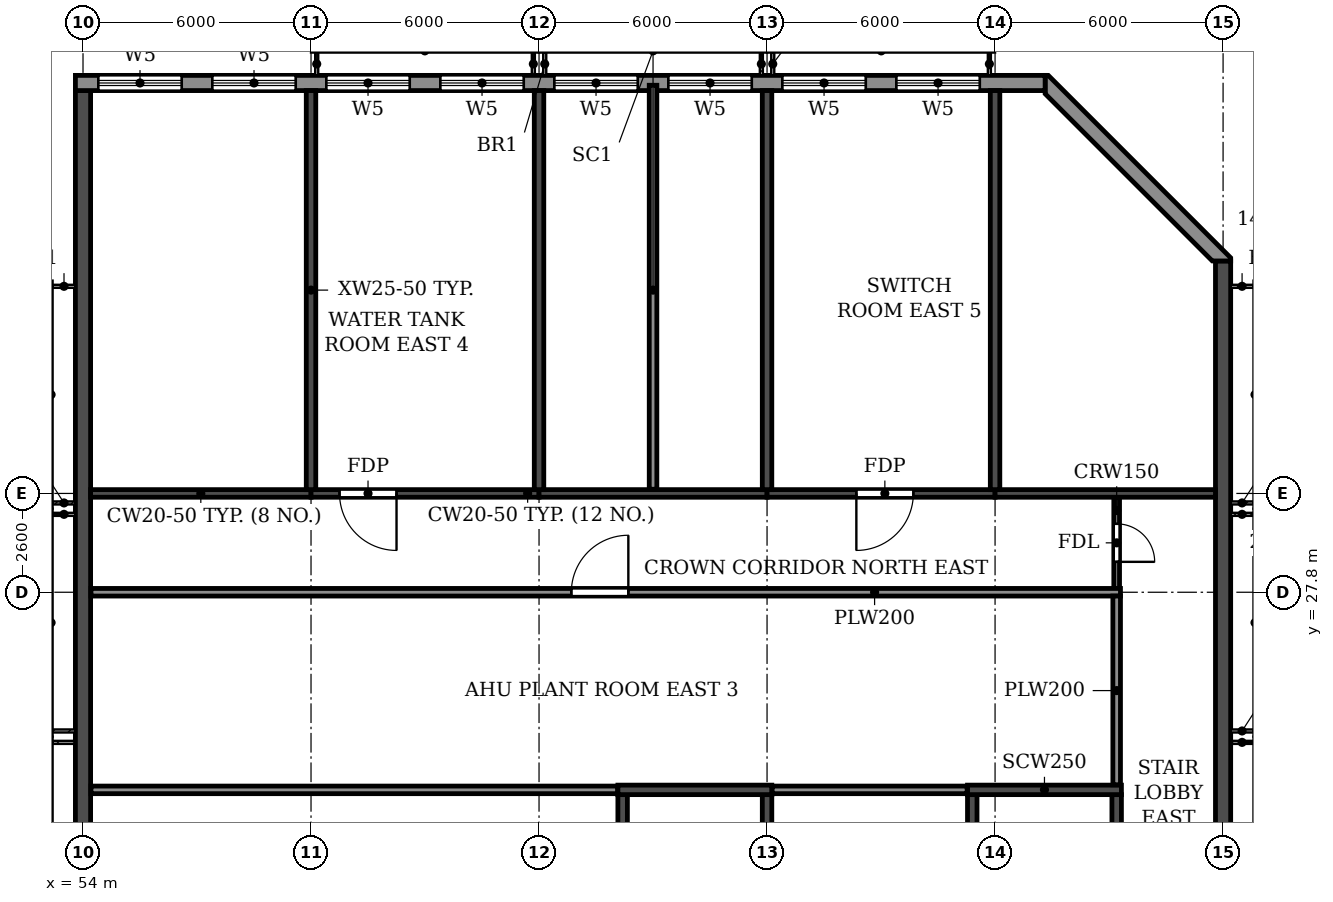
"""IFC4 building model, lengths in metres.
Left out: names, types, materials, properties, quantities, classifications, styles, units other than length and angle.
Written with IfcOpenShell. Run it as: python <this file> out.ifc"""

import sys

from ifc_helpers import new_model, si_unit, direction, frame, frame_2d, origin, place, context, subcontext, project, spatial, polyline, rectangle, outline, extrude, element, fill, save


model = new_model("IFC4")
c1 = context("Model", 3, precision=1e-05, world=origin(), true_north=direction((0.0, 1.0)))
c2 = subcontext(c1, "Body", "Model", "MODEL_VIEW")
j1 = project(units=[si_unit("LENGTHUNIT", "METRE"), si_unit("PLANEANGLEUNIT", "RADIAN")], contexts=[c1])
p1 = place(None, origin())
s1 = spatial("IfcSite", under=j1, at=p1, CompositionType="ELEMENT")
p2 = place(p1, origin())
s2 = spatial("IfcBuilding", under=s1, at=p2, CompositionType="ELEMENT")
p3 = place(p2, frame((0.0, 0.0, 282.3)))
s3 = spatial("IfcBuildingStorey", under=s2, at=p3, CompositionType="ELEMENT", Elevation=282.3)
for number, where, z_axis, x_axis in (
    (1, (60.0, 30.5, 0.0), (0.0, 0.0, 1.0), (0.0, 1.0, 0.0)),
    (2, (66.0, 30.5, 0.0), (0.0, 0.0, 1.0), (0.0, 1.0, 0.0)),
    (3, (72.0, 30.5, 0.0), (0.0, 0.0, 1.0), (0.0, 1.0, 0.0)),
    (4, (78.0, 30.5, 0.0), (0.0, 0.0, 1.0), (0.0, 1.0, 0.0)),
):
    element("IfcWall", number, at=place(p3, frame(where, z_axis=z_axis, x_axis=x_axis)), inside=s3, PredefinedType="SHEAR", context=c2, shape_type="SweptSolid", body=[
        extrude(rectangle(XDim=10.5, YDim=0.25, at=frame_2d((5.25, 0.0))), origin(), (0.0, 0.0, 1.0), 3.05),
    ])
p4 = place(p3, frame((54.0, 0.2, 0.0), z_axis=(0.0, 0.0, 1.0), x_axis=(0.0, 1.0, 0.0)))
e5 = element("IfcWall", 5, at=p4, inside=s3, PredefinedType="SHEAR", context=c2, shape_type="SweptSolid", body=[
    extrude(rectangle(XDim=40.8, YDim=0.4, at=frame_2d((20.4, 0.0))), origin(), (0.0, 0.0, 1.0), 3.05),
])
p5 = place(p3, frame((84.0, 4.683, 0.0), z_axis=(0.0, 0.0, 1.0), x_axis=(0.0, 1.0, 0.0)))
e6 = element("IfcWall", 6, at=p5, inside=s3, PredefinedType="SHEAR", context=c2, shape_type="SweptSolid", body=[
    extrude(rectangle(XDim=31.834, YDim=0.4, at=frame_2d((15.917, 0.0))), origin(), (0.0, 0.0, 1.0), 3.05),
])
p6 = place(p3, frame((54.2, 30.4, 0.0), z_axis=(0.0, 0.0, 1.0), x_axis=(1.0, 0.0, 0.0)))
e7 = element("IfcWall", 7, at=p6, inside=s3, PredefinedType="SHEAR", context=c2, shape_type="SweptSolid", body=[
    extrude(rectangle(XDim=5.8, YDim=0.2, at=frame_2d((2.9, 0.0))), origin(), (0.0, 0.0, 1.0), 2.45),
])
p7 = place(p3, frame((60.0, 30.4, 0.0), z_axis=(0.0, 0.0, 1.0), x_axis=(1.0, 0.0, 0.0)))
e8 = element("IfcWall", 8, at=p7, inside=s3, PredefinedType="SHEAR", context=c2, shape_type="SweptSolid", body=[
    extrude(rectangle(XDim=6.0, YDim=0.2, at=frame_2d((3.0, 0.0))), origin(), (0.0, 0.0, 1.0), 2.45),
])
p8 = place(p7, frame((0.75, 0.0, 0.0)))
e9 = element("IfcOpeningElement", 9, at=p8, cuts=e8, PredefinedType="OPENING", context=c2, shape_type="SweptSolid", body=[
    extrude(rectangle(XDim=1.5, YDim=2.1, at=frame_2d((0.75, 1.05))), frame((0.0, 0.11, 0.0), z_axis=(0.0, -1.0, 0.0), x_axis=(1.0, 0.0, 0.0)), (0.0, 0.0, 1.0), 0.22),
])
p9 = place(p3, frame((66.0, 30.4, 0.0), z_axis=(0.0, 0.0, 1.0), x_axis=(1.0, 0.0, 0.0)))
e10 = element("IfcWall", 10, at=p9, inside=s3, PredefinedType="SHEAR", context=c2, shape_type="SweptSolid", body=[
    extrude(rectangle(XDim=6.0, YDim=0.2, at=frame_2d((3.0, 0.0))), origin(), (0.0, 0.0, 1.0), 2.45),
])
p10 = place(p3, frame((72.0, 30.4, 0.0), z_axis=(0.0, 0.0, 1.0), x_axis=(1.0, 0.0, 0.0)))
e11 = element("IfcWall", 11, at=p10, inside=s3, PredefinedType="SHEAR", context=c2, shape_type="SweptSolid", body=[
    extrude(rectangle(XDim=6.0, YDim=0.2, at=frame_2d((3.0, 0.0))), origin(), (0.0, 0.0, 1.0), 2.45),
])
p11 = place(p10, frame((2.35, 0.0, 0.0)))
e12 = element("IfcOpeningElement", 12, at=p11, cuts=e11, PredefinedType="OPENING", context=c2, shape_type="SweptSolid", body=[
    extrude(rectangle(XDim=1.5, YDim=2.1, at=frame_2d((0.75, 1.05))), frame((0.0, 0.11, 0.0), z_axis=(0.0, -1.0, 0.0), x_axis=(1.0, 0.0, 0.0)), (0.0, 0.0, 1.0), 0.22),
])
p12 = place(p3, frame((78.0, 30.4, 0.0), z_axis=(0.0, 0.0, 1.0), x_axis=(1.0, 0.0, 0.0)))
e13 = element("IfcWall", 13, at=p12, inside=s3, PredefinedType="SHEAR", context=c2, shape_type="SweptSolid", body=[
    extrude(rectangle(XDim=5.8, YDim=0.2, at=frame_2d((2.9, 0.0))), origin(), (0.0, 0.0, 1.0), 2.45),
])
p13 = place(p3, frame((77.4, 14.6, 0.0), z_axis=(0.0, 0.0, 1.0), x_axis=(0.0, 1.0, 0.0)))
e14 = element("IfcWall", 14, at=p13, inside=s3, PredefinedType="SOLIDWALL", context=c2, shape_type="SweptSolid", body=[
    extrude(rectangle(XDim=7.875, YDim=0.25, at=frame_2d((3.938, 0.0))), origin(), (0.0, 0.0, 1.0), 3.05),
])
p14 = place(p3, frame((81.2, 14.6, 0.0), z_axis=(0.0, 0.0, 1.0), x_axis=(0.0, 1.0, 0.0)))
e15 = element("IfcWall", 15, at=p14, inside=s3, PredefinedType="SOLIDWALL", context=c2, shape_type="SweptSolid", body=[
    extrude(rectangle(XDim=7.875, YDim=0.25, at=frame_2d((3.938, 0.0))), origin(), (0.0, 0.0, 1.0), 3.05),
])
p15 = place(p14, frame((0.7, 0.0, 0.0)))
e16 = element("IfcOpeningElement", 16, at=p15, cuts=e15, PredefinedType="OPENING", context=c2, shape_type="SweptSolid", body=[
    extrude(rectangle(XDim=1.0, YDim=2.1, at=frame_2d((0.5, 1.05))), frame((0.0, 0.135, 0.0), z_axis=(0.0, -1.0, 0.0), x_axis=(1.0, 0.0, 0.0)), (0.0, 0.0, 1.0), 0.27),
])
p16 = place(p3, frame((77.275, 22.6, 0.0), z_axis=(0.0, 0.0, 1.0), x_axis=(1.0, 0.0, 0.0)))
e17 = element("IfcWall", 17, at=p16, inside=s3, PredefinedType="SOLIDWALL", context=c2, shape_type="SweptSolid", body=[
    extrude(rectangle(XDim=4.05, YDim=0.25, at=frame_2d((2.025, 0.0))), origin(), (0.0, 0.0, 1.0), 3.05),
])
for number, where, z_axis, x_axis in (
    (18, (68.2, 14.6, 0.0), (0.0, 0.0, 1.0), (0.0, 1.0, 0.0)),
    (19, (72.0, 14.6, 0.0), (0.0, 0.0, 1.0), (0.0, 1.0, 0.0)),
):
    element("IfcWall", number, at=place(p3, frame(where, z_axis=z_axis, x_axis=x_axis)), inside=s3, PredefinedType="SOLIDWALL", context=c2, shape_type="SweptSolid", body=[
        extrude(rectangle(XDim=7.875, YDim=0.25, at=frame_2d((3.938, 0.0))), origin(), (0.0, 0.0, 1.0), 3.05),
    ])
p17 = place(p3, frame((68.075, 22.6, 0.0), z_axis=(0.0, 0.0, 1.0), x_axis=(1.0, 0.0, 0.0)))
e20 = element("IfcWall", 20, at=p17, inside=s3, PredefinedType="SOLIDWALL", context=c2, shape_type="SweptSolid", body=[
    extrude(rectangle(XDim=4.05, YDim=0.25, at=frame_2d((2.025, 0.0))), origin(), (0.0, 0.0, 1.0), 3.05),
])
p18 = place(p3, origin())
e21 = element("IfcWall", 21, at=p18, inside=s3, PredefinedType="STANDARD", context=c2, shape_type="SweptSolid", body=[
    extrude(outline(polyline([(84.2, 36.517), (84.2, 36.6), (79.4, 41.4), (79.317, 41.4), (79.317, 40.917), (83.717, 36.517), (84.2, 36.517)])), origin(), (0.0, 0.0, 1.0), 3.05),
])
p19 = place(p3, frame((79.317, 41.2, 0.0), z_axis=(0.0, 0.0, 1.0), x_axis=(-1.0, 0.0, 0.0)))
e22 = element("IfcWall", 22, at=p19, inside=s3, PredefinedType="STANDARD", context=c2, shape_type="SweptSolid", body=[
    extrude(rectangle(XDim=25.517, YDim=0.4, at=frame_2d((12.759, 0.0))), origin(), (0.0, 0.0, 1.0), 3.05),
])
p20 = place(p19, frame((22.717, 0.0, 0.6)))
e23 = element("IfcOpeningElement", 23, at=p20, cuts=e22, PredefinedType="OPENING", context=c2, shape_type="SweptSolid", body=[
    extrude(rectangle(XDim=2.2, YDim=2.4, at=frame_2d((1.1, 1.2))), frame((0.0, 0.21, 0.0), z_axis=(0.0, -1.0, 0.0), x_axis=(1.0, 0.0, 0.0)), (0.0, 0.0, 1.0), 0.42),
])
p21 = place(p19, frame((19.717, 0.0, 0.6)))
e24 = element("IfcOpeningElement", 24, at=p21, cuts=e22, PredefinedType="OPENING", context=c2, shape_type="SweptSolid", body=[
    extrude(rectangle(XDim=2.2, YDim=2.4, at=frame_2d((1.1, 1.2))), frame((0.0, 0.21, 0.0), z_axis=(0.0, -1.0, 0.0), x_axis=(1.0, 0.0, 0.0)), (0.0, 0.0, 1.0), 0.42),
])
p22 = place(p19, frame((16.717, 0.0, 0.6)))
e25 = element("IfcOpeningElement", 25, at=p22, cuts=e22, PredefinedType="OPENING", context=c2, shape_type="SweptSolid", body=[
    extrude(rectangle(XDim=2.2, YDim=2.4, at=frame_2d((1.1, 1.2))), frame((0.0, 0.21, 0.0), z_axis=(0.0, -1.0, 0.0), x_axis=(1.0, 0.0, 0.0)), (0.0, 0.0, 1.0), 0.42),
])
p23 = place(p19, frame((13.717, 0.0, 0.6)))
e26 = element("IfcOpeningElement", 26, at=p23, cuts=e22, PredefinedType="OPENING", context=c2, shape_type="SweptSolid", body=[
    extrude(rectangle(XDim=2.2, YDim=2.4, at=frame_2d((1.1, 1.2))), frame((0.0, 0.21, 0.0), z_axis=(0.0, -1.0, 0.0), x_axis=(1.0, 0.0, 0.0)), (0.0, 0.0, 1.0), 0.42),
])
p24 = place(p19, frame((10.717, 0.0, 0.6)))
e27 = element("IfcOpeningElement", 27, at=p24, cuts=e22, PredefinedType="OPENING", context=c2, shape_type="SweptSolid", body=[
    extrude(rectangle(XDim=2.2, YDim=2.4, at=frame_2d((1.1, 1.2))), frame((0.0, 0.21, 0.0), z_axis=(0.0, -1.0, 0.0), x_axis=(1.0, 0.0, 0.0)), (0.0, 0.0, 1.0), 0.42),
])
p25 = place(p19, frame((7.717, 0.0, 0.6)))
e28 = element("IfcOpeningElement", 28, at=p25, cuts=e22, PredefinedType="OPENING", context=c2, shape_type="SweptSolid", body=[
    extrude(rectangle(XDim=2.2, YDim=2.4, at=frame_2d((1.1, 1.2))), frame((0.0, 0.21, 0.0), z_axis=(0.0, -1.0, 0.0), x_axis=(1.0, 0.0, 0.0)), (0.0, 0.0, 1.0), 0.42),
])
p26 = place(p19, frame((4.717, 0.0, 0.6)))
e29 = element("IfcOpeningElement", 29, at=p26, cuts=e22, PredefinedType="OPENING", context=c2, shape_type="SweptSolid", body=[
    extrude(rectangle(XDim=2.2, YDim=2.4, at=frame_2d((1.1, 1.2))), frame((0.0, 0.21, 0.0), z_axis=(0.0, -1.0, 0.0), x_axis=(1.0, 0.0, 0.0)), (0.0, 0.0, 1.0), 0.42),
])
p27 = place(p19, frame((1.717, 0.0, 0.6)))
e30 = element("IfcOpeningElement", 30, at=p27, cuts=e22, PredefinedType="OPENING", context=c2, shape_type="SweptSolid", body=[
    extrude(rectangle(XDim=2.2, YDim=2.4, at=frame_2d((1.1, 1.2))), frame((0.0, 0.21, 0.0), z_axis=(0.0, -1.0, 0.0), x_axis=(1.0, 0.0, 0.0)), (0.0, 0.0, 1.0), 0.42),
])
p28 = place(p3, frame((81.2, 27.9, 0.0), z_axis=(0.0, 0.0, 1.0), x_axis=(0.0, 1.0, 0.0)))
e31 = element("IfcWall", 31, at=p28, inside=s3, PredefinedType="PARTITIONING", context=c2, shape_type="SweptSolid", body=[
    extrude(rectangle(XDim=2.39, YDim=0.15, at=frame_2d((1.195, 0.0))), origin(), (0.0, 0.0, 1.0), 3.05),
])
p29 = place(p28, frame((0.7, 0.0, 0.0)))
e32 = element("IfcOpeningElement", 32, at=p29, cuts=e31, PredefinedType="OPENING", context=c2, shape_type="SweptSolid", body=[
    extrude(rectangle(XDim=1.0, YDim=2.1, at=frame_2d((0.5, 1.05))), frame((0.0, 0.085, 0.0), z_axis=(0.0, -1.0, 0.0), x_axis=(1.0, 0.0, 0.0)), (0.0, 0.0, 1.0), 0.17),
])
p30 = place(p3, frame((54.21, 22.6, 0.0), z_axis=(0.0, 0.0, 1.0), x_axis=(1.0, 0.0, 0.0)))
e33 = element("IfcWall", 33, at=p30, inside=s3, PredefinedType="PARTITIONING", context=c2, shape_type="SweptSolid", body=[
    extrude(rectangle(XDim=13.855, YDim=0.2, at=frame_2d((6.927, 0.0))), origin(), (0.0, 0.0, 1.0), 3.05),
])
p31 = place(p3, frame((72.135, 22.6, 0.0), z_axis=(0.0, 0.0, 1.0), x_axis=(1.0, 0.0, 0.0)))
e34 = element("IfcWall", 34, at=p31, inside=s3, PredefinedType="PARTITIONING", context=c2, shape_type="SweptSolid", body=[
    extrude(rectangle(XDim=5.13, YDim=0.2, at=frame_2d((2.565, 0.0))), origin(), (0.0, 0.0, 1.0), 3.05),
])
p32 = place(p3, frame((54.21, 27.8, 0.0), z_axis=(0.0, 0.0, 1.0), x_axis=(1.0, 0.0, 0.0)))
e35 = element("IfcWall", 35, at=p32, inside=s3, PredefinedType="PARTITIONING", context=c2, shape_type="SweptSolid", body=[
    extrude(rectangle(XDim=27.09, YDim=0.2, at=frame_2d((13.545, 0.0))), origin(), (0.0, 0.0, 1.0), 3.05),
])
p33 = place(p32, frame((12.64, 0.0, 0.0)))
e36 = element("IfcOpeningElement", 36, at=p33, cuts=e35, PredefinedType="OPENING", context=c2, shape_type="SweptSolid", body=[
    extrude(rectangle(XDim=1.5, YDim=2.1, at=frame_2d((0.75, 1.05))), frame((0.0, 0.11, 0.0), z_axis=(0.0, -1.0, 0.0), x_axis=(1.0, 0.0, 0.0)), (0.0, 0.0, 1.0), 0.22),
])
p34 = place(p3, frame((69.0, 30.51, 0.0), z_axis=(0.0, 0.0, 1.0), x_axis=(0.0, 1.0, 0.0)))
e37 = element("IfcWall", 37, at=p34, inside=s3, PredefinedType="PARTITIONING", context=c2, shape_type="SweptSolid", body=[
    extrude(rectangle(XDim=10.63, YDim=0.2, at=frame_2d((5.315, 0.0))), origin(), (0.0, 0.0, 1.0), 3.05),
])
p35 = place(p3, frame((81.2, 22.735, 0.0), z_axis=(0.0, 0.0, 1.0), x_axis=(0.0, 1.0, 0.0)))
e38 = element("IfcWall", 38, at=p35, inside=s3, PredefinedType="PARTITIONING", context=c2, shape_type="SweptSolid", body=[
    extrude(rectangle(XDim=4.965, YDim=0.2, at=frame_2d((2.482, 0.0))), origin(), (0.0, 0.0, 1.0), 3.05),
])
p36 = place(p20, origin())
e39 = element("IfcWindow", 39, at=p36, inside=s3, PartitioningType="TRIPLE_PANEL_HORIZONTAL", PredefinedType="WINDOW", context=c2, shape_type="SweptSolid", body=[
    extrude(rectangle(XDim=2.2, YDim=2.4, at=frame_2d((1.1, 1.2))), frame((0.0, 0.03, 0.0), z_axis=(0.0, -1.0, 0.0), x_axis=(1.0, 0.0, 0.0)), (0.0, 0.0, 1.0), 0.06),
])
fill(e23, e39)
p37 = place(p21, origin())
e40 = element("IfcWindow", 40, at=p37, inside=s3, PartitioningType="TRIPLE_PANEL_HORIZONTAL", PredefinedType="WINDOW", context=c2, shape_type="SweptSolid", body=[
    extrude(rectangle(XDim=2.2, YDim=2.4, at=frame_2d((1.1, 1.2))), frame((0.0, 0.03, 0.0), z_axis=(0.0, -1.0, 0.0), x_axis=(1.0, 0.0, 0.0)), (0.0, 0.0, 1.0), 0.06),
])
fill(e24, e40)
p38 = place(p22, origin())
e41 = element("IfcWindow", 41, at=p38, inside=s3, PartitioningType="TRIPLE_PANEL_HORIZONTAL", PredefinedType="WINDOW", context=c2, shape_type="SweptSolid", body=[
    extrude(rectangle(XDim=2.2, YDim=2.4, at=frame_2d((1.1, 1.2))), frame((0.0, 0.03, 0.0), z_axis=(0.0, -1.0, 0.0), x_axis=(1.0, 0.0, 0.0)), (0.0, 0.0, 1.0), 0.06),
])
fill(e25, e41)
p39 = place(p23, origin())
e42 = element("IfcWindow", 42, at=p39, inside=s3, PartitioningType="TRIPLE_PANEL_HORIZONTAL", PredefinedType="WINDOW", context=c2, shape_type="SweptSolid", body=[
    extrude(rectangle(XDim=2.2, YDim=2.4, at=frame_2d((1.1, 1.2))), frame((0.0, 0.03, 0.0), z_axis=(0.0, -1.0, 0.0), x_axis=(1.0, 0.0, 0.0)), (0.0, 0.0, 1.0), 0.06),
])
fill(e26, e42)
p40 = place(p24, origin())
e43 = element("IfcWindow", 43, at=p40, inside=s3, PartitioningType="TRIPLE_PANEL_HORIZONTAL", PredefinedType="WINDOW", context=c2, shape_type="SweptSolid", body=[
    extrude(rectangle(XDim=2.2, YDim=2.4, at=frame_2d((1.1, 1.2))), frame((0.0, 0.03, 0.0), z_axis=(0.0, -1.0, 0.0), x_axis=(1.0, 0.0, 0.0)), (0.0, 0.0, 1.0), 0.06),
])
fill(e27, e43)
p41 = place(p25, origin())
e44 = element("IfcWindow", 44, at=p41, inside=s3, PartitioningType="TRIPLE_PANEL_HORIZONTAL", PredefinedType="WINDOW", context=c2, shape_type="SweptSolid", body=[
    extrude(rectangle(XDim=2.2, YDim=2.4, at=frame_2d((1.1, 1.2))), frame((0.0, 0.03, 0.0), z_axis=(0.0, -1.0, 0.0), x_axis=(1.0, 0.0, 0.0)), (0.0, 0.0, 1.0), 0.06),
])
fill(e28, e44)
p42 = place(p26, origin())
e45 = element("IfcWindow", 45, at=p42, inside=s3, PartitioningType="TRIPLE_PANEL_HORIZONTAL", PredefinedType="WINDOW", context=c2, shape_type="SweptSolid", body=[
    extrude(rectangle(XDim=2.2, YDim=2.4, at=frame_2d((1.1, 1.2))), frame((0.0, 0.03, 0.0), z_axis=(0.0, -1.0, 0.0), x_axis=(1.0, 0.0, 0.0)), (0.0, 0.0, 1.0), 0.06),
])
fill(e29, e45)
p43 = place(p27, origin())
e46 = element("IfcWindow", 46, at=p43, inside=s3, PartitioningType="TRIPLE_PANEL_HORIZONTAL", PredefinedType="WINDOW", context=c2, shape_type="SweptSolid", body=[
    extrude(rectangle(XDim=2.2, YDim=2.4, at=frame_2d((1.1, 1.2))), frame((0.0, 0.03, 0.0), z_axis=(0.0, -1.0, 0.0), x_axis=(1.0, 0.0, 0.0)), (0.0, 0.0, 1.0), 0.06),
])
fill(e30, e46)
p44 = place(p8, frame((1.5, 0.0, 0.0), z_axis=(0.0, 0.0, 1.0), x_axis=(-1.0, 0.0, 0.0)))
e47 = element("IfcDoor", 47, at=p44, inside=s3, OperationType="DOUBLE_DOOR_SINGLE_SWING", PredefinedType="DOOR", context=c2, shape_type="SweptSolid", body=[
    extrude(rectangle(XDim=1.5, YDim=2.1, at=frame_2d((0.75, 1.05))), frame((0.0, 0.025, 0.0), z_axis=(0.0, -1.0, 0.0), x_axis=(1.0, 0.0, 0.0)), (0.0, 0.0, 1.0), 0.05),
])
fill(e9, e47)
p45 = place(p33, origin())
e48 = element("IfcDoor", 48, at=p45, inside=s3, OperationType="DOUBLE_DOOR_SINGLE_SWING", PredefinedType="DOOR", context=c2, shape_type="SweptSolid", body=[
    extrude(rectangle(XDim=1.5, YDim=2.1, at=frame_2d((0.75, 1.05))), frame((0.0, 0.025, 0.0), z_axis=(0.0, -1.0, 0.0), x_axis=(1.0, 0.0, 0.0)), (0.0, 0.0, 1.0), 0.05),
])
fill(e36, e48)
p46 = place(p11, frame((1.5, 0.0, 0.0), z_axis=(0.0, 0.0, 1.0), x_axis=(-1.0, 0.0, 0.0)))
e49 = element("IfcDoor", 49, at=p46, inside=s3, OperationType="DOUBLE_DOOR_SINGLE_SWING", PredefinedType="DOOR", context=c2, shape_type="SweptSolid", body=[
    extrude(rectangle(XDim=1.5, YDim=2.1, at=frame_2d((0.75, 1.05))), frame((0.0, 0.025, 0.0), z_axis=(0.0, -1.0, 0.0), x_axis=(1.0, 0.0, 0.0)), (0.0, 0.0, 1.0), 0.05),
])
fill(e12, e49)
p47 = place(p29, frame((1.0, 0.0, 0.0), z_axis=(0.0, 0.0, 1.0), x_axis=(-1.0, 0.0, 0.0)))
e50 = element("IfcDoor", 50, at=p47, inside=s3, OperationType="SINGLE_SWING_RIGHT", PredefinedType="DOOR", context=c2, shape_type="SweptSolid", body=[
    extrude(rectangle(XDim=1.0, YDim=2.1, at=frame_2d((0.5, 1.05))), frame((0.0, 0.025, 0.0), z_axis=(0.0, -1.0, 0.0), x_axis=(1.0, 0.0, 0.0)), (0.0, 0.0, 1.0), 0.05),
])
fill(e32, e50)
save(model, sys.argv[1])
